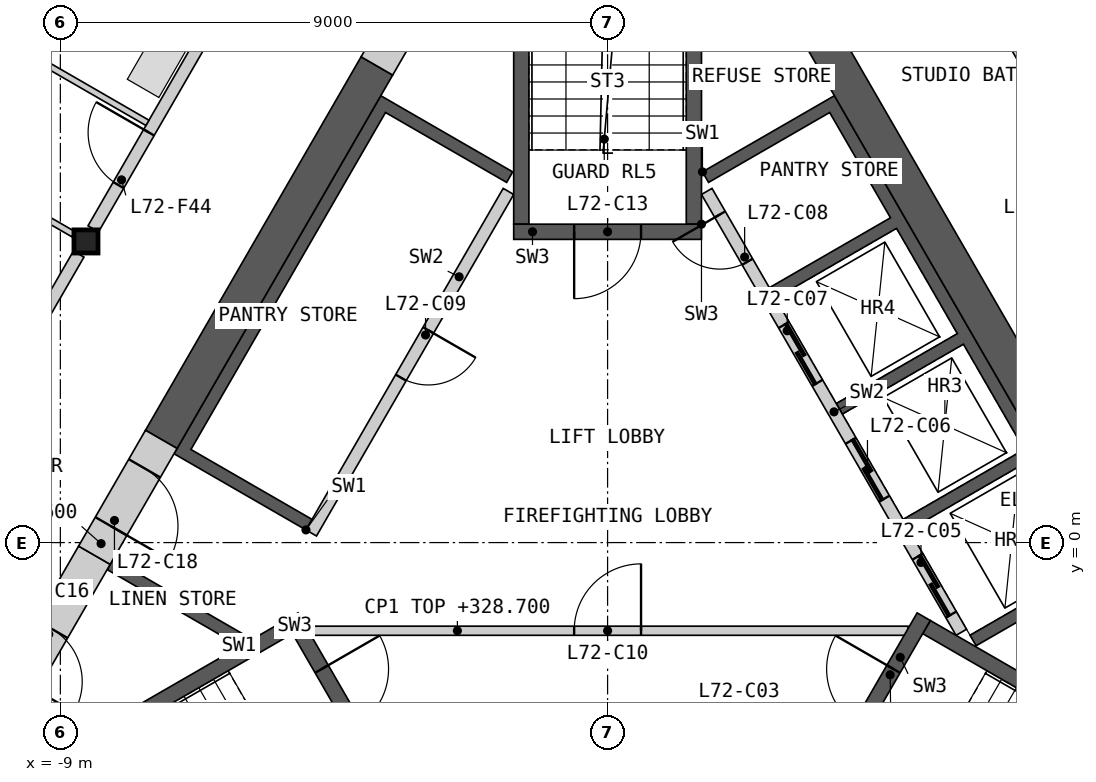
"""IFC4 building model, lengths in metres.
Left out: names, types, materials, properties, quantities, classifications, styles, units other than length and angle.
Written with IfcOpenShell. Run it as: python <this file> out.ifc"""

import sys

from ifc_helpers import new_model, si_unit, direction, frame, frame_2d, origin, origin_2d, place, context, subcontext, project, spatial, polyline, rectangle, i_section, outline, extrude, element, fill, save


model = new_model("IFC4")
c1 = context("Model", 3, precision=1e-05, world=origin(), true_north=direction((0.0, 1.0)))
c2 = subcontext(c1, "Body", "Model", "MODEL_VIEW")
j1 = project(units=[si_unit("LENGTHUNIT", "METRE"), si_unit("PLANEANGLEUNIT", "RADIAN")], contexts=[c1])
p1 = place(None, origin())
s1 = spatial("IfcSite", under=j1, at=p1, CompositionType="ELEMENT")
p2 = place(p1, origin())
s2 = spatial("IfcBuilding", under=s1, at=p2, CompositionType="ELEMENT")
p3 = place(p2, frame((0.0, 0.0, 325.6)))
s3 = spatial("IfcBuildingStorey", under=s2, at=p3, CompositionType="ELEMENT", Elevation=325.6)
p4 = place(p3, frame((-8.578, 4.953, 0.0), z_axis=(0.0, 0.0, 1.0), x_axis=(1.0, 0.0, 0.0)))
e1 = element("IfcColumn", 1, at=p4, inside=s3, PredefinedType="COLUMN", context=c2, shape_type="SweptSolid", body=[
    extrude(i_section(OverallWidth=0.396, OverallDepth=0.381, WebThickness=0.019, FlangeThickness=0.03, at=origin_2d()), origin(), (0.0, 0.0, 1.0), 3.4),
])
p5 = place(p3, origin())
e2 = element("IfcWall", 2, at=p5, inside=s3, PredefinedType="SHEAR", context=c2, shape_type="SweptSolid", body=[
    extrude(outline(polyline([(1.561, 6.097), (3.731, 7.35), (8.231, -0.444), (6.061, -1.697), (5.96, -1.524), (7.952, -0.374), (6.952, 1.358), (4.96, 0.208), (4.861, 0.381), (6.852, 1.531), (5.852, 3.263), (3.861, 2.113), (3.76, 2.287), (5.752, 3.437), (4.752, 5.169), (2.76, 4.019), (2.66, 4.192), (4.652, 5.342), (3.652, 7.074), (1.66, 5.924), (1.561, 6.097)])), origin(), (0.0, 0.0, 1.0), 3.1),
])
p6 = place(p3, frame((5.817, -1.476, 0.0), z_axis=(0.0, 0.0, 1.0), x_axis=(-0.500002616675, 0.866023893041, 0.0)))
e3 = element("IfcWall", 3, at=p6, inside=s3, PredefinedType="SOLIDWALL", context=c2, shape_type="SweptSolid", body=[
    extrude(rectangle(XDim=8.373, YDim=0.2, at=frame_2d((4.187, 0.0))), origin(), (0.0, 0.0, 1.0), 3.1),
])
p7 = place(p6, frame((0.337, 0.0, 0.0)))
e4 = element("IfcOpeningElement", 4, at=p7, cuts=e3, PredefinedType="OPENING", context=c2, shape_type="SweptSolid", body=[
    extrude(rectangle(XDim=1.1, YDim=2.1, at=frame_2d((0.55, 1.05))), frame((0.0, 0.11, 0.0), z_axis=(0.0, -1.0, 0.0), x_axis=(1.0, 0.0, 0.0)), (0.0, 0.0, 1.0), 0.22),
])
p8 = place(p6, frame((2.537, 0.0, 0.0)))
e5 = element("IfcOpeningElement", 5, at=p8, cuts=e3, PredefinedType="OPENING", context=c2, shape_type="SweptSolid", body=[
    extrude(rectangle(XDim=1.1, YDim=2.1, at=frame_2d((0.55, 1.05))), frame((0.0, 0.11, 0.0), z_axis=(0.0, -1.0, 0.0), x_axis=(1.0, 0.0, 0.0)), (0.0, 0.0, 1.0), 0.22),
])
p9 = place(p6, frame((4.737, 0.0, 0.0)))
e6 = element("IfcOpeningElement", 6, at=p9, cuts=e3, PredefinedType="OPENING", context=c2, shape_type="SweptSolid", body=[
    extrude(rectangle(XDim=1.1, YDim=2.1, at=frame_2d((0.55, 1.05))), frame((0.0, 0.11, 0.0), z_axis=(0.0, -1.0, 0.0), x_axis=(1.0, 0.0, 0.0)), (0.0, 0.0, 1.0), 0.22),
])
p10 = place(p6, frame((7.037, 0.0, 0.0)))
e7 = element("IfcOpeningElement", 7, at=p10, cuts=e3, PredefinedType="OPENING", context=c2, shape_type="SweptSolid", body=[
    extrude(rectangle(XDim=0.9, YDim=2.1, at=frame_2d((0.45, 1.05))), frame((0.0, 0.11, 0.0), z_axis=(0.0, -1.0, 0.0), x_axis=(1.0, 0.0, 0.0)), (0.0, 0.0, 1.0), 0.22),
])
p11 = place(p3, origin())
e8 = element("IfcWall", 8, at=p11, inside=s3, PredefinedType="SHEAR", context=c2, shape_type="SweptSolid", body=[
    extrude(outline(polyline([(-6.061, -1.697), (-8.231, -0.444), (-8.131, -0.271), (-5.96, -1.524), (-6.061, -1.697)])), origin(), (0.0, 0.0, 1.0), 3.1),
])
p12 = place(p3, origin())
e9 = element("IfcWall", 9, at=p12, inside=s3, PredefinedType="SHEAR", context=c2, shape_type="SweptSolid", body=[
    extrude(outline(polyline([(-4.96, 0.208), (-7.131, 1.461), (-3.731, 7.35), (-1.561, 6.097), (-1.66, 5.924), (-3.652, 7.074), (-6.852, 1.531), (-4.861, 0.381), (-4.96, 0.208)])), origin(), (0.0, 0.0, 1.0), 3.1),
])
p13 = place(p3, frame((-1.631, 5.776, 0.0), z_axis=(0.0, 0.0, 1.0), x_axis=(-0.499992876559, -0.866029516466, 0.0)))
e10 = element("IfcWall", 10, at=p13, inside=s3, PredefinedType="SOLIDWALL", context=c2, shape_type="SweptSolid", body=[
    extrude(rectangle(XDim=6.486, YDim=0.2, at=frame_2d((3.243, 0.0))), origin(), (0.0, 0.0, 1.0), 3.1),
])
p14 = place(p13, frame((2.637, 0.0, 0.0)))
e11 = element("IfcOpeningElement", 11, at=p14, cuts=e10, PredefinedType="OPENING", context=c2, shape_type="SweptSolid", body=[
    extrude(rectangle(XDim=0.9, YDim=2.1, at=frame_2d((0.45, 1.05))), frame((0.0, 0.11, 0.0), z_axis=(0.0, -1.0, 0.0), x_axis=(1.0, 0.0, 0.0)), (0.0, 0.0, 1.0), 0.22),
])
p15 = place(p3, frame((-4.941, -1.45, 0.0), z_axis=(0.0, 0.0, 1.0), x_axis=(1.0, 0.0, 0.0)))
e12 = element("IfcWall", 12, at=p15, inside=s3, PredefinedType="PARTITIONING", context=c2, shape_type="SweptSolid", body=[
    extrude(rectangle(XDim=9.882, YDim=0.15, at=frame_2d((4.941, 0.0))), origin(), (0.0, 0.0, 1.0), 3.1),
])
p16 = place(p15, frame((4.391, 0.0, 0.0)))
e13 = element("IfcOpeningElement", 13, at=p16, cuts=e12, PredefinedType="OPENING", context=c2, shape_type="SweptSolid", body=[
    extrude(rectangle(XDim=1.1, YDim=2.1, at=frame_2d((0.55, 1.05))), frame((0.0, 0.085, 0.0), z_axis=(0.0, -1.0, 0.0), x_axis=(1.0, 0.0, 0.0)), (0.0, 0.0, 1.0), 0.17),
])
p17 = place(p3, origin())
e14 = element("IfcWall", 14, at=p17, inside=s3, PredefinedType="SHEAR", context=c2, shape_type="SweptSolid", body=[
    extrude(outline(polyline([(-5.307, -1.281), (-10.374, -4.206), (-10.032, -4.298), (-5.182, -1.498), (-5.307, -1.281)])), origin(), (0.0, 0.0, 1.0), 3.1),
])
p18 = place(p3, frame((-5.199, -1.219, 0.0), z_axis=(0.0, 0.0, 1.0), x_axis=(0.499982516597, -0.866035497597, 0.0)))
e15 = element("IfcWall", 15, at=p18, inside=s3, PredefinedType="SHEAR", context=c2, shape_type="SweptSolid", body=[
    extrude(rectangle(XDim=3.088, YDim=0.25, at=frame_2d((1.544, 0.0))), origin(), (0.0, 0.0, 1.0), 3.1),
])
p19 = place(p18, frame((0.994, 0.0, 0.0)))
e16 = element("IfcOpeningElement", 16, at=p19, cuts=e15, PredefinedType="OPENING", context=c2, shape_type="SweptSolid", body=[
    extrude(rectangle(XDim=1.1, YDim=2.1, at=frame_2d((0.55, 1.05))), frame((0.0, 0.135, 0.0), z_axis=(0.0, -1.0, 0.0), x_axis=(1.0, 0.0, 0.0)), (0.0, 0.0, 1.0), 0.27),
])
p20 = place(p3, origin())
e17 = element("IfcWall", 17, at=p20, inside=s3, PredefinedType="SHEAR", context=c2, shape_type="SweptSolid", body=[
    extrude(outline(polyline([(10.032, -4.298), (10.374, -4.206), (5.307, -1.281), (5.182, -1.498), (10.032, -4.298)])), origin(), (0.0, 0.0, 1.0), 3.1),
])
p21 = place(p3, frame((3.655, -3.893, 0.0), z_axis=(0.0, 0.0, 1.0), x_axis=(0.499982516597, 0.866035497597, 0.0)))
e18 = element("IfcWall", 18, at=p21, inside=s3, PredefinedType="SHEAR", context=c2, shape_type="SweptSolid", body=[
    extrude(rectangle(XDim=3.088, YDim=0.25, at=frame_2d((1.544, 0.0))), origin(), (0.0, 0.0, 1.0), 3.1),
])
p22 = place(p21, frame((0.994, 0.0, 0.0)))
e19 = element("IfcOpeningElement", 19, at=p22, cuts=e18, PredefinedType="OPENING", context=c2, shape_type="SweptSolid", body=[
    extrude(rectangle(XDim=1.1, YDim=2.1, at=frame_2d((0.55, 1.05))), frame((0.0, 0.135, 0.0), z_axis=(0.0, -1.0, 0.0), x_axis=(1.0, 0.0, 0.0)), (0.0, 0.0, 1.0), 0.27),
])
p23 = place(p3, origin())
e20 = element("IfcWall", 20, at=p23, inside=s3, PredefinedType="SHEAR", context=c2, shape_type="SweptSolid", body=[
    extrude(outline(polyline([(1.544, 5.237), (1.544, 11.087), (1.294, 10.837), (1.294, 5.237), (1.544, 5.237)])), origin(), (0.0, 0.0, 1.0), 3.1),
])
p24 = place(p3, origin())
e21 = element("IfcWall", 21, at=p24, inside=s3, PredefinedType="SHEAR", context=c2, shape_type="SweptSolid", body=[
    extrude(outline(polyline([(-1.294, 10.837), (-1.544, 11.087), (-1.544, 5.237), (-1.294, 5.237), (-1.294, 10.837)])), origin(), (0.0, 0.0, 1.0), 3.1),
])
p25 = place(p3, frame((1.544, 5.112, 0.0), z_axis=(0.0, 0.0, 1.0), x_axis=(-1.0, 0.0, 0.0)))
e22 = element("IfcWall", 22, at=p25, inside=s3, PredefinedType="SHEAR", context=c2, shape_type="SweptSolid", body=[
    extrude(rectangle(XDim=3.088, YDim=0.25, at=frame_2d((1.544, 0.0))), origin(), (0.0, 0.0, 1.0), 3.1),
])
p26 = place(p25, frame((0.994, 0.0, 0.0)))
e23 = element("IfcOpeningElement", 23, at=p26, cuts=e22, PredefinedType="OPENING", context=c2, shape_type="SweptSolid", body=[
    extrude(rectangle(XDim=1.1, YDim=2.1, at=frame_2d((0.55, 1.05))), frame((0.0, 0.135, 0.0), z_axis=(0.0, -1.0, 0.0), x_axis=(1.0, 0.0, 0.0)), (0.0, 0.0, 1.0), 0.27),
])
p27 = place(p3, frame((8.686, -0.634, 0.0), z_axis=(0.0, 0.0, 1.0), x_axis=(-0.500004601921, 0.866022746848, 0.0)))
e24 = element("IfcWall", 24, at=p27, inside=s3, PredefinedType="SHEAR", context=c2, shape_type="SweptSolid", body=[
    extrude(rectangle(XDim=16.853, YDim=0.6, at=frame_2d((8.426, 0.0))), origin(), (0.0, 0.0, 1.0), 3.1),
])
p28 = place(p3, frame((-3.794, 7.84, 0.0), z_axis=(0.0, 0.0, 1.0), x_axis=(-0.499974747889, -0.866039982607, 0.0)))
e25 = element("IfcWall", 25, at=p28, inside=s3, PredefinedType="SHEAR", context=c2, shape_type="SweptSolid", body=[
    extrude(rectangle(XDim=7.092, YDim=0.6, at=frame_2d((3.546, 0.0))), origin(), (0.0, 0.0, 1.0), 3.1),
])
p29 = place(p3, frame((-8.44, -0.208, 0.0), z_axis=(0.0, 0.0, 1.0), x_axis=(-0.499997052475, -0.866027105532, 0.0)))
e26 = element("IfcWall", 26, at=p29, inside=s3, PredefinedType="SHEAR", context=c2, shape_type="SweptSolid", body=[
    extrude(rectangle(XDim=3.001, YDim=0.6, at=frame_2d((1.501, 0.0))), origin(), (0.0, 0.0, 1.0), 3.1),
])
p30 = place(p29, frame((1.4, 0.0, 0.0)))
e27 = element("IfcOpeningElement", 27, at=p30, cuts=e26, PredefinedType="OPENING", context=c2, shape_type="SweptSolid", body=[
    extrude(rectangle(XDim=1.0, YDim=2.1, at=frame_2d((0.5, 1.05))), frame((0.0, 0.31, 0.0), z_axis=(0.0, -1.0, 0.0), x_axis=(1.0, 0.0, 0.0)), (0.0, 0.0, 1.0), 0.62),
])
p31 = place(p3, frame((-2.694, 9.745, 0.0), z_axis=(0.0, 0.0, 1.0), x_axis=(-0.50002983664, -0.866008176907, 0.0)))
e28 = element("IfcWall", 28, at=p31, inside=s3, PredefinedType="SHEAR", context=c2, shape_type="SweptSolid", body=[
    extrude(rectangle(XDim=2.2, YDim=0.6, at=frame_2d((1.1, 0.0))), origin(), (0.0, 0.0, 1.0), 3.1),
])
p32 = place(p31, frame((0.6, 0.0, 0.0)))
e29 = element("IfcOpeningElement", 29, at=p32, cuts=e28, PredefinedType="OPENING", context=c2, shape_type="SweptSolid", body=[
    extrude(rectangle(XDim=1.0, YDim=2.1, at=frame_2d((0.5, 1.05))), frame((0.0, 0.31, 0.0), z_axis=(0.0, -1.0, 0.0), x_axis=(1.0, 0.0, 0.0)), (0.0, 0.0, 1.0), 0.62),
])
p33 = place(p3, frame((-7.34, 1.698, 0.0), z_axis=(0.0, 0.0, 1.0), x_axis=(-0.50002983664, -0.866008176907, 0.0)))
e30 = element("IfcWall", 30, at=p33, inside=s3, PredefinedType="SHEAR", context=c2, shape_type="SweptSolid", body=[
    extrude(rectangle(XDim=2.2, YDim=0.6, at=frame_2d((1.1, 0.0))), origin(), (0.0, 0.0, 1.0), 3.1),
])
p34 = place(p33, frame((0.55, 0.0, 0.0)))
e31 = element("IfcOpeningElement", 31, at=p34, cuts=e30, PredefinedType="OPENING", context=c2, shape_type="SweptSolid", body=[
    extrude(rectangle(XDim=1.1, YDim=2.1, at=frame_2d((0.55, 1.05))), frame((0.0, 0.31, 0.0), z_axis=(0.0, -1.0, 0.0), x_axis=(1.0, 0.0, 0.0)), (0.0, 0.0, 1.0), 0.62),
])
p35 = place(p3, frame((4.409, 12.174, 0.0), z_axis=(0.0, 0.0, 1.0), x_axis=(0.499984266882, -0.866034487114, 0.0)))
e32 = element("IfcWall", 32, at=p35, inside=s3, PredefinedType="PARTITIONING", context=c2, shape_type="SweptSolid", body=[
    extrude(rectangle(XDim=8.099, YDim=0.2, at=frame_2d((4.049, 0.0))), origin(), (0.0, 0.0, 1.0), 3.1),
])
p36 = place(p35, frame((6.269, 0.0, 0.0)))
e33 = element("IfcOpeningElement", 33, at=p36, cuts=e32, PredefinedType="OPENING", context=c2, shape_type="SweptSolid", body=[
    extrude(rectangle(XDim=1.0, YDim=2.1, at=frame_2d((0.5, 1.05))), frame((0.0, 0.11, 0.0), z_axis=(0.0, -1.0, 0.0), x_axis=(1.0, 0.0, 0.0)), (0.0, 0.0, 1.0), 0.22),
])
p37 = place(p35, frame((1.164, 0.0, 0.0)))
e34 = element("IfcOpeningElement", 34, at=p37, cuts=e32, PredefinedType="OPENING", context=c2, shape_type="SweptSolid", body=[
    extrude(rectangle(XDim=1.0, YDim=2.1, at=frame_2d((0.5, 1.05))), frame((0.0, 0.11, 0.0), z_axis=(0.0, -1.0, 0.0), x_axis=(1.0, 0.0, 0.0)), (0.0, 0.0, 1.0), 0.22),
])
p38 = place(p3, frame((-8.458, 5.16, 0.0), z_axis=(0.0, 0.0, 1.0), x_axis=(0.499984266882, 0.866034487114, 0.0)))
e35 = element("IfcWall", 35, at=p38, inside=s3, PredefinedType="PARTITIONING", context=c2, shape_type="SweptSolid", body=[
    extrude(rectangle(XDim=8.099, YDim=0.2, at=frame_2d((4.049, 0.0))), origin(), (0.0, 0.0, 1.0), 3.1),
])
p39 = place(p38, frame((5.935, 0.0, 0.0)))
e36 = element("IfcOpeningElement", 36, at=p39, cuts=e35, PredefinedType="OPENING", context=c2, shape_type="SweptSolid", body=[
    extrude(rectangle(XDim=1.0, YDim=2.1, at=frame_2d((0.5, 1.05))), frame((0.0, 0.11, 0.0), z_axis=(0.0, -1.0, 0.0), x_axis=(1.0, 0.0, 0.0)), (0.0, 0.0, 1.0), 0.22),
])
p40 = place(p38, frame((0.83, 0.0, 0.0)))
e37 = element("IfcOpeningElement", 37, at=p40, cuts=e35, PredefinedType="OPENING", context=c2, shape_type="SweptSolid", body=[
    extrude(rectangle(XDim=1.0, YDim=2.1, at=frame_2d((0.5, 1.05))), frame((0.0, 0.11, 0.0), z_axis=(0.0, -1.0, 0.0), x_axis=(1.0, 0.0, 0.0)), (0.0, 0.0, 1.0), 0.22),
])
p41 = place(p3, frame((-12.748, -2.269, 0.0), z_axis=(0.0, 0.0, 1.0), x_axis=(0.499984266882, 0.866034487114, 0.0)))
e38 = element("IfcWall", 38, at=p41, inside=s3, PredefinedType="PARTITIONING", context=c2, shape_type="SweptSolid", body=[
    extrude(rectangle(XDim=8.099, YDim=0.2, at=frame_2d((4.049, 0.0))), origin(), (0.0, 0.0, 1.0), 3.1),
])
p42 = place(p41, frame((1.164, 0.0, 0.0)))
e39 = element("IfcOpeningElement", 39, at=p42, cuts=e38, PredefinedType="OPENING", context=c2, shape_type="SweptSolid", body=[
    extrude(rectangle(XDim=1.0, YDim=2.1, at=frame_2d((0.5, 1.05))), frame((0.0, 0.11, 0.0), z_axis=(0.0, -1.0, 0.0), x_axis=(1.0, 0.0, 0.0)), (0.0, 0.0, 1.0), 0.22),
])
p43 = place(p3, frame((-19.615, 11.325, 0.0), z_axis=(0.0, 0.0, 1.0), x_axis=(0.86602139559, -0.500006942333, 0.0)))
e40 = element("IfcWall", 40, at=p43, inside=s3, PredefinedType="PARTITIONING", context=c2, shape_type="SweptSolid", body=[
    extrude(rectangle(XDim=12.505, YDim=0.1, at=frame_2d((6.252, 0.0))), origin(), (0.0, 0.0, 1.0), 2.33),
])
p44 = place(p43, frame((6.28, 0.0, 0.0)))
e41 = element("IfcOpeningElement", 41, at=p44, cuts=e40, PredefinedType="OPENING", context=c2, shape_type="SweptSolid", body=[
    extrude(rectangle(XDim=0.95, YDim=2.1, at=frame_2d((0.475, 1.05))), frame((0.0, 0.06, 0.0), z_axis=(0.0, -1.0, 0.0), x_axis=(1.0, 0.0, 0.0)), (0.0, 0.0, 1.0), 0.12),
])
p45 = place(p3, frame((-12.721, 9.878, 0.0), z_axis=(0.0, 0.0, 1.0), x_axis=(0.866027751316, -0.499995933934, 0.0)))
e42 = element("IfcWall", 42, at=p45, inside=s3, PredefinedType="PARTITIONING", context=c2, shape_type="SweptSolid", body=[
    extrude(rectangle(XDim=5.95, YDim=0.1, at=frame_2d((2.975, 0.0))), origin(), (0.0, 0.0, 1.0), 2.33),
])
p46 = place(p45, frame((0.65, 0.0, 0.0)))
e43 = element("IfcOpeningElement", 43, at=p46, cuts=e42, PredefinedType="OPENING", context=c2, shape_type="SweptSolid", body=[
    extrude(rectangle(XDim=0.95, YDim=2.1, at=frame_2d((0.475, 1.05))), frame((0.0, 0.06, 0.0), z_axis=(0.0, -1.0, 0.0), x_axis=(1.0, 0.0, 0.0)), (0.0, 0.0, 1.0), 0.12),
])
p47 = place(p7, origin())
e44 = element("IfcDoor", 44, at=p47, inside=s3, OperationType="SLIDING_TO_LEFT", PredefinedType="DOOR", context=c2, shape_type="SweptSolid", body=[
    extrude(rectangle(XDim=1.1, YDim=2.1, at=frame_2d((0.55, 1.05))), frame((0.0, 0.025, 0.0), z_axis=(0.0, -1.0, 0.0), x_axis=(1.0, 0.0, 0.0)), (0.0, 0.0, 1.0), 0.05),
])
fill(e4, e44)
p48 = place(p8, origin())
e45 = element("IfcDoor", 45, at=p48, inside=s3, OperationType="SLIDING_TO_LEFT", PredefinedType="DOOR", context=c2, shape_type="SweptSolid", body=[
    extrude(rectangle(XDim=1.1, YDim=2.1, at=frame_2d((0.55, 1.05))), frame((0.0, 0.025, 0.0), z_axis=(0.0, -1.0, 0.0), x_axis=(1.0, 0.0, 0.0)), (0.0, 0.0, 1.0), 0.05),
])
fill(e5, e45)
p49 = place(p9, origin())
e46 = element("IfcDoor", 46, at=p49, inside=s3, OperationType="SLIDING_TO_LEFT", PredefinedType="DOOR", context=c2, shape_type="SweptSolid", body=[
    extrude(rectangle(XDim=1.1, YDim=2.1, at=frame_2d((0.55, 1.05))), frame((0.0, 0.025, 0.0), z_axis=(0.0, -1.0, 0.0), x_axis=(1.0, 0.0, 0.0)), (0.0, 0.0, 1.0), 0.05),
])
fill(e6, e46)
p50 = place(p10, origin())
e47 = element("IfcDoor", 47, at=p50, inside=s3, OperationType="SINGLE_SWING_RIGHT", PredefinedType="DOOR", context=c2, shape_type="SweptSolid", body=[
    extrude(rectangle(XDim=0.9, YDim=2.1, at=frame_2d((0.45, 1.05))), frame((0.0, 0.025, 0.0), z_axis=(0.0, -1.0, 0.0), x_axis=(1.0, 0.0, 0.0)), (0.0, 0.0, 1.0), 0.05),
])
fill(e7, e47)
p51 = place(p14, origin())
e48 = element("IfcDoor", 48, at=p51, inside=s3, OperationType="SINGLE_SWING_LEFT", PredefinedType="DOOR", context=c2, shape_type="SweptSolid", body=[
    extrude(rectangle(XDim=0.9, YDim=2.1, at=frame_2d((0.45, 1.05))), frame((0.0, 0.025, 0.0), z_axis=(0.0, -1.0, 0.0), x_axis=(1.0, 0.0, 0.0)), (0.0, 0.0, 1.0), 0.05),
])
fill(e11, e48)
p52 = place(p16, origin())
e49 = element("IfcDoor", 49, at=p52, inside=s3, OperationType="SINGLE_SWING_RIGHT", PredefinedType="DOOR", context=c2, shape_type="SweptSolid", body=[
    extrude(rectangle(XDim=1.1, YDim=2.1, at=frame_2d((0.55, 1.05))), frame((0.0, 0.025, 0.0), z_axis=(0.0, -1.0, 0.0), x_axis=(1.0, 0.0, 0.0)), (0.0, 0.0, 1.0), 0.05),
])
fill(e13, e49)
p53 = place(p19, origin())
e50 = element("IfcDoor", 50, at=p53, inside=s3, OperationType="SINGLE_SWING_LEFT", PredefinedType="DOOR", context=c2, shape_type="SweptSolid", body=[
    extrude(rectangle(XDim=1.1, YDim=2.1, at=frame_2d((0.55, 1.05))), frame((0.0, 0.025, 0.0), z_axis=(0.0, -1.0, 0.0), x_axis=(1.0, 0.0, 0.0)), (0.0, 0.0, 1.0), 0.05),
])
fill(e16, e50)
p54 = place(p22, origin())
e51 = element("IfcDoor", 51, at=p54, inside=s3, OperationType="SINGLE_SWING_RIGHT", PredefinedType="DOOR", context=c2, shape_type="SweptSolid", body=[
    extrude(rectangle(XDim=1.1, YDim=2.1, at=frame_2d((0.55, 1.05))), frame((0.0, 0.025, 0.0), z_axis=(0.0, -1.0, 0.0), x_axis=(1.0, 0.0, 0.0)), (0.0, 0.0, 1.0), 0.05),
])
fill(e19, e51)
p55 = place(p26, origin())
e52 = element("IfcDoor", 52, at=p55, inside=s3, OperationType="SINGLE_SWING_RIGHT", PredefinedType="DOOR", context=c2, shape_type="SweptSolid", body=[
    extrude(rectangle(XDim=1.1, YDim=2.1, at=frame_2d((0.55, 1.05))), frame((0.0, 0.025, 0.0), z_axis=(0.0, -1.0, 0.0), x_axis=(1.0, 0.0, 0.0)), (0.0, 0.0, 1.0), 0.05),
])
fill(e23, e52)
p56 = place(p30, origin())
e53 = element("IfcDoor", 53, at=p56, inside=s3, OperationType="SINGLE_SWING_RIGHT", PredefinedType="DOOR", context=c2, shape_type="SweptSolid", body=[
    extrude(rectangle(XDim=1.0, YDim=2.1, at=frame_2d((0.5, 1.05))), frame((0.0, 0.055, 0.0), z_axis=(0.0, -1.0, 0.0), x_axis=(1.0, 0.0, 0.0)), (0.0, 0.0, 1.0), 0.05),
])
fill(e27, e53)
p57 = place(p34, origin())
e54 = element("IfcDoor", 54, at=p57, inside=s3, OperationType="SINGLE_SWING_RIGHT", PredefinedType="DOOR", context=c2, shape_type="SweptSolid", body=[
    extrude(rectangle(XDim=1.1, YDim=2.1, at=frame_2d((0.55, 1.05))), frame((0.0, 0.055, 0.0), z_axis=(0.0, -1.0, 0.0), x_axis=(1.0, 0.0, 0.0)), (0.0, 0.0, 1.0), 0.05),
])
fill(e31, e54)
p58 = place(p40, origin())
e55 = element("IfcDoor", 55, at=p58, inside=s3, OperationType="SINGLE_SWING_RIGHT", PredefinedType="DOOR", context=c2, shape_type="SweptSolid", body=[
    extrude(rectangle(XDim=1.0, YDim=2.1, at=frame_2d((0.5, 1.05))), frame((0.0, 0.025, 0.0), z_axis=(0.0, -1.0, 0.0), x_axis=(1.0, 0.0, 0.0)), (0.0, 0.0, 1.0), 0.05),
])
fill(e37, e55)
save(model, sys.argv[1])
